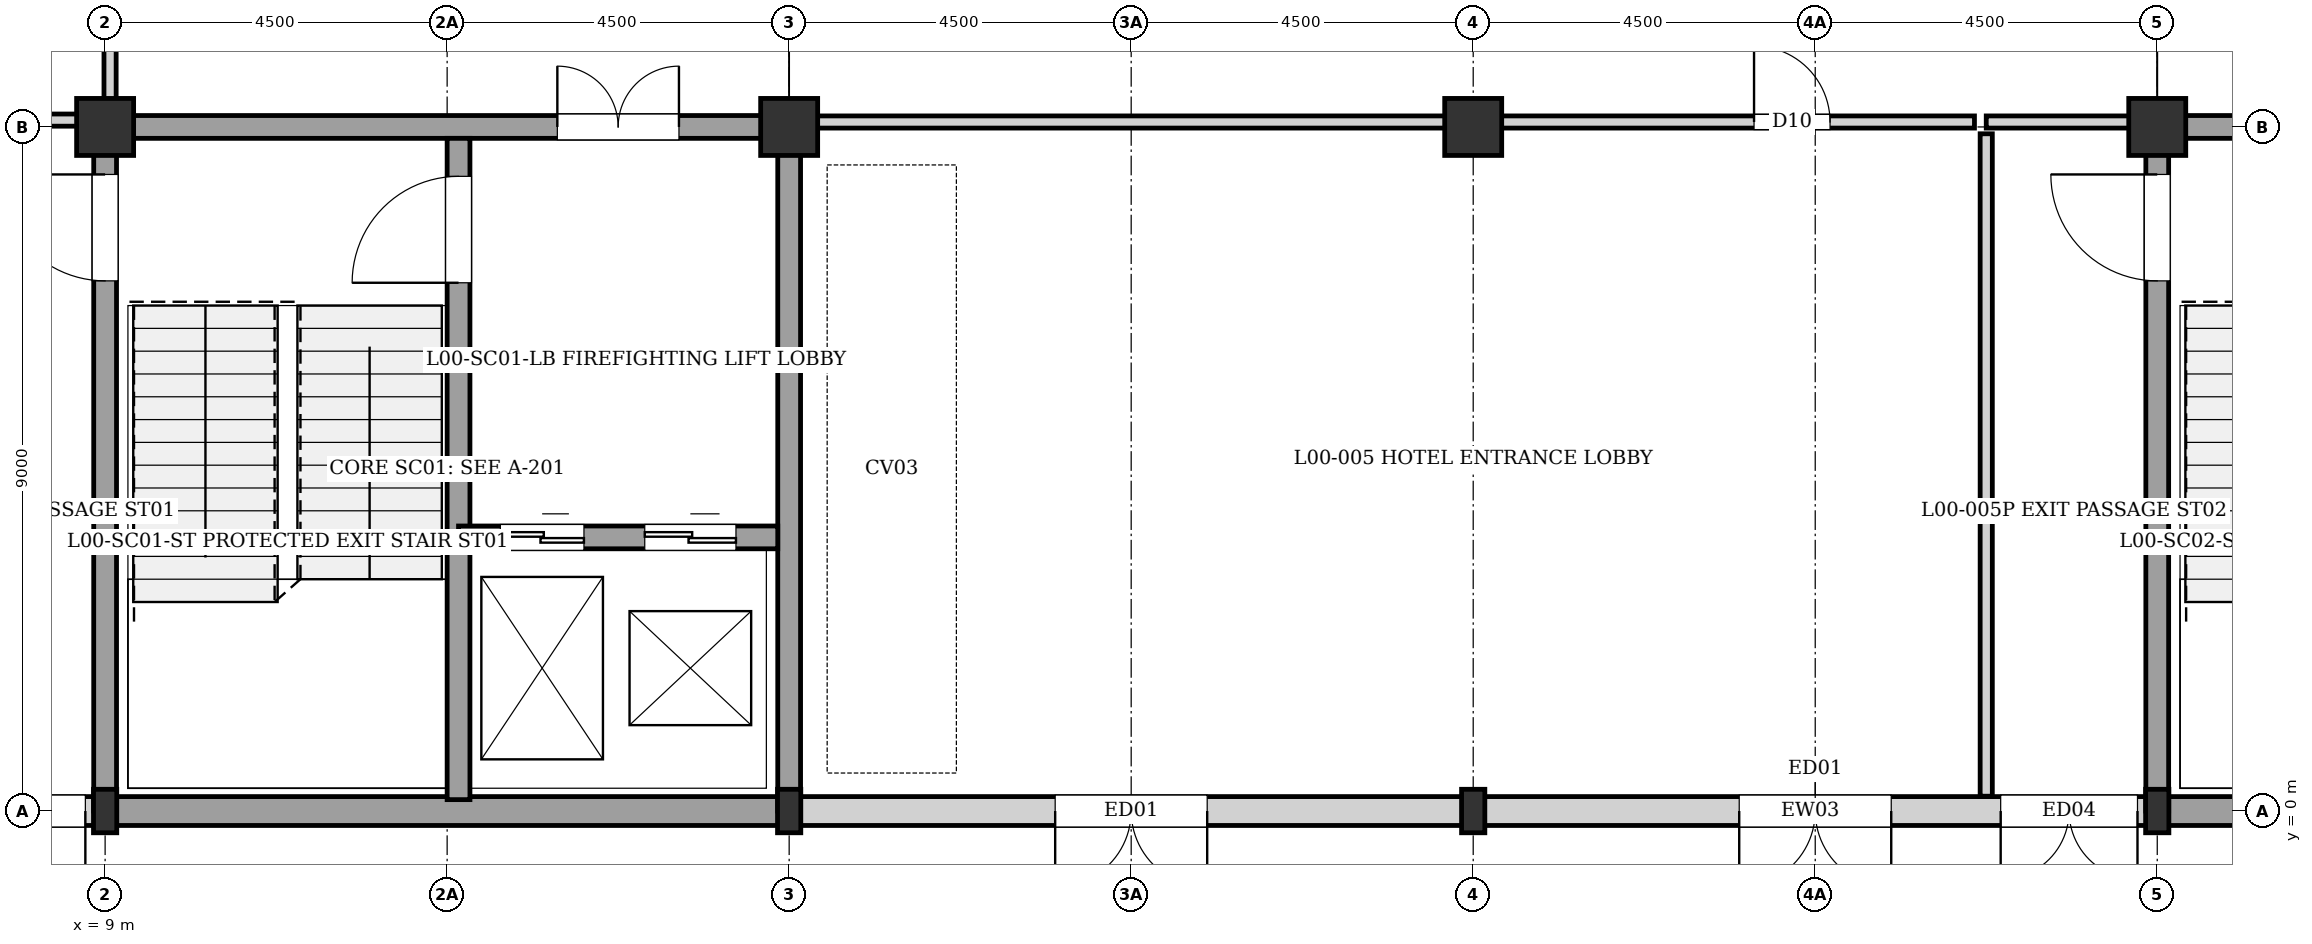
"""IFC4 building model, lengths in metres.
Left out: names, types, materials, properties, quantities, classifications, styles, units other than length and angle.
Written with IfcOpenShell. Run it as: python <this file> out.ifc"""

import sys

from ifc_helpers import new_model, si_unit, direction, frame, frame_2d, origin, origin_2d, place, context, subcontext, project, spatial, rectangle, i_section, extrude, element, fill, save


model = new_model("IFC4")
c1 = context("Model", 3, precision=1e-05, world=origin(), true_north=direction((0.0, 1.0)))
c2 = subcontext(c1, "Body", "Model", "MODEL_VIEW")
j1 = project(units=[si_unit("LENGTHUNIT", "METRE"), si_unit("PLANEANGLEUNIT", "RADIAN")], contexts=[c1])
p1 = place(None, origin())
s1 = spatial("IfcSite", under=j1, at=p1, CompositionType="ELEMENT")
p2 = place(p1, origin())
s2 = spatial("IfcBuilding", under=s1, at=p2, CompositionType="ELEMENT")
p3 = place(p2, origin())
s3 = spatial("IfcBuildingStorey", under=s2, at=p3, CompositionType="ELEMENT", Elevation=0.0)
p4 = place(p3, frame((9.0, 0.0, 0.0), z_axis=(0.0, 0.0, 1.0), x_axis=(1.0, 0.0, 0.0)))
e1 = element("IfcColumn", 1, at=p4, inside=s3, PredefinedType="COLUMN", context=c2, shape_type="SweptSolid", body=[
    extrude(i_section(OverallWidth=0.306, OverallDepth=0.572, WebThickness=0.021, FlangeThickness=0.04, at=origin_2d()), origin(), (0.0, 0.0, 1.0), 4.32),
])
p5 = place(p3, frame((9.0, 9.0, 0.0), z_axis=(0.0, 0.0, 1.0), x_axis=(1.0, 0.0, 0.0)))
e2 = element("IfcColumn", 2, at=p5, inside=s3, PredefinedType="COLUMN", context=c2, shape_type="SweptSolid", body=[
    extrude(rectangle(XDim=0.75, YDim=0.75, at=origin_2d()), origin(), (0.0, 0.0, 1.0), 4.32),
])
p6 = place(p3, frame((18.0, 0.0, 0.0), z_axis=(0.0, 0.0, 1.0), x_axis=(1.0, 0.0, 0.0)))
e3 = element("IfcColumn", 3, at=p6, inside=s3, PredefinedType="COLUMN", context=c2, shape_type="SweptSolid", body=[
    extrude(i_section(OverallWidth=0.306, OverallDepth=0.572, WebThickness=0.021, FlangeThickness=0.04, at=origin_2d()), origin(), (0.0, 0.0, 1.0), 4.32),
])
p7 = place(p3, frame((18.0, 9.0, 0.0), z_axis=(0.0, 0.0, 1.0), x_axis=(1.0, 0.0, 0.0)))
e4 = element("IfcColumn", 4, at=p7, inside=s3, PredefinedType="COLUMN", context=c2, shape_type="SweptSolid", body=[
    extrude(rectangle(XDim=0.75, YDim=0.75, at=origin_2d()), origin(), (0.0, 0.0, 1.0), 4.32),
])
p8 = place(p3, frame((27.0, 0.0, 0.0), z_axis=(0.0, 0.0, 1.0), x_axis=(1.0, 0.0, 0.0)))
e5 = element("IfcColumn", 5, at=p8, inside=s3, PredefinedType="COLUMN", context=c2, shape_type="SweptSolid", body=[
    extrude(i_section(OverallWidth=0.306, OverallDepth=0.572, WebThickness=0.021, FlangeThickness=0.04, at=origin_2d()), origin(), (0.0, 0.0, 1.0), 4.32),
])
p9 = place(p3, frame((27.0, 9.0, 0.0), z_axis=(0.0, 0.0, 1.0), x_axis=(1.0, 0.0, 0.0)))
e6 = element("IfcColumn", 6, at=p9, inside=s3, PredefinedType="COLUMN", context=c2, shape_type="SweptSolid", body=[
    extrude(rectangle(XDim=0.75, YDim=0.75, at=origin_2d()), origin(), (0.0, 0.0, 1.0), 4.32),
])
p10 = place(p3, frame((36.0, 0.0, 0.0), z_axis=(0.0, 0.0, 1.0), x_axis=(1.0, 0.0, 0.0)))
e7 = element("IfcColumn", 7, at=p10, inside=s3, PredefinedType="COLUMN", context=c2, shape_type="SweptSolid", body=[
    extrude(i_section(OverallWidth=0.306, OverallDepth=0.572, WebThickness=0.021, FlangeThickness=0.04, at=origin_2d()), origin(), (0.0, 0.0, 1.0), 4.32),
])
p11 = place(p3, frame((36.0, 9.0, 0.0), z_axis=(0.0, 0.0, 1.0), x_axis=(1.0, 0.0, 0.0)))
e8 = element("IfcColumn", 8, at=p11, inside=s3, PredefinedType="COLUMN", context=c2, shape_type="SweptSolid", body=[
    extrude(rectangle(XDim=0.75, YDim=0.75, at=origin_2d()), origin(), (0.0, 0.0, 1.0), 4.32),
])
p12 = place(p3, frame((45.0, 0.0, 0.0), z_axis=(0.0, 0.0, 1.0), x_axis=(-1.0, 0.0, 0.0)))
e9 = element("IfcWall", 9, at=p12, inside=s3, PredefinedType="SOLIDWALL", context=c2, shape_type="SweptSolid", body=[
    extrude(rectangle(XDim=9.0, YDim=0.38, at=frame_2d((4.5, 0.0))), origin(), (0.0, 0.0, 1.0), 4.055),
])
p13 = place(p3, frame((35.87, 0.0, 0.0), z_axis=(0.0, 0.0, 1.0), x_axis=(-1.0, 0.0, 0.0)))
e10 = element("IfcWall", 10, at=p13, inside=s3, PredefinedType="SOLIDWALL", context=c2, shape_type="SweptSolid", body=[
    extrude(rectangle(XDim=8.87, YDim=0.38, at=frame_2d((4.435, 0.0))), origin(), (0.0, 0.0, 1.0), 3.755),
])
p14 = place(p13, frame((0.13, 0.0, 0.0)))
e11 = element("IfcOpeningElement", 11, at=p14, cuts=e10, PredefinedType="OPENING", context=c2, shape_type="SweptSolid", body=[
    extrude(rectangle(XDim=1.8, YDim=2.2, at=frame_2d((0.9, 1.1))), frame((0.0, 0.2, 0.0), z_axis=(0.0, -1.0, 0.0), x_axis=(1.0, 0.0, 0.0)), (0.0, 0.0, 1.0), 0.4),
])
p15 = place(p13, frame((3.37, 0.0, 0.0)))
e12 = element("IfcOpeningElement", 12, at=p15, cuts=e10, PredefinedType="OPENING", context=c2, shape_type="SweptSolid", body=[
    extrude(rectangle(XDim=2.0, YDim=2.4, at=frame_2d((1.0, 1.2))), frame((0.0, 0.2, 0.0), z_axis=(0.0, -1.0, 0.0), x_axis=(1.0, 0.0, 0.0)), (0.0, 0.0, 1.0), 0.4),
])
p16 = place(p3, frame((27.0, 0.0, 0.0), z_axis=(0.0, 0.0, 1.0), x_axis=(-1.0, 0.0, 0.0)))
e13 = element("IfcWall", 13, at=p16, inside=s3, PredefinedType="SOLIDWALL", context=c2, shape_type="SweptSolid", body=[
    extrude(rectangle(XDim=8.87, YDim=0.38, at=frame_2d((4.435, 0.0))), origin(), (0.0, 0.0, 1.0), 3.825),
])
p17 = place(p16, frame((3.5, 0.0, 0.0)))
e14 = element("IfcOpeningElement", 14, at=p17, cuts=e13, PredefinedType="OPENING", context=c2, shape_type="SweptSolid", body=[
    extrude(rectangle(XDim=2.0, YDim=2.4, at=frame_2d((1.0, 1.2))), frame((0.0, 0.2, 0.0), z_axis=(0.0, -1.0, 0.0), x_axis=(1.0, 0.0, 0.0)), (0.0, 0.0, 1.0), 0.4),
])
p18 = place(p3, frame((18.0, 0.0, 0.0), z_axis=(0.0, 0.0, 1.0), x_axis=(-1.0, 0.0, 0.0)))
e15 = element("IfcWall", 15, at=p18, inside=s3, PredefinedType="SOLIDWALL", context=c2, shape_type="SweptSolid", body=[
    extrude(rectangle(XDim=9.0, YDim=0.38, at=frame_2d((4.5, 0.0))), origin(), (0.0, 0.0, 1.0), 4.055),
])
p19 = place(p3, frame((8.87, 0.0, 0.0), z_axis=(0.0, 0.0, 1.0), x_axis=(-1.0, 0.0, 0.0)))
e16 = element("IfcWall", 16, at=p19, inside=s3, PredefinedType="SOLIDWALL", context=c2, shape_type="SweptSolid", body=[
    extrude(rectangle(XDim=8.87, YDim=0.38, at=frame_2d((4.435, 0.0))), origin(), (0.0, 0.0, 1.0), 3.695),
])
p20 = place(p19, frame((0.13, 0.0, 0.0)))
e17 = element("IfcOpeningElement", 17, at=p20, cuts=e16, PredefinedType="OPENING", context=c2, shape_type="SweptSolid", body=[
    extrude(rectangle(XDim=1.8, YDim=2.2, at=frame_2d((0.9, 1.1))), frame((0.0, 0.2, 0.0), z_axis=(0.0, -1.0, 0.0), x_axis=(1.0, 0.0, 0.0)), (0.0, 0.0, 1.0), 0.4),
])
p21 = place(p19, frame((3.27, 0.0, 0.4)))
e18 = element("IfcOpeningElement", 18, at=p21, cuts=e16, PredefinedType="OPENING", context=c2, shape_type="SweptSolid", body=[
    extrude(rectangle(XDim=2.2, YDim=1.8, at=frame_2d((1.1, 0.9))), frame((0.0, 0.2, 0.0), z_axis=(0.0, -1.0, 0.0), x_axis=(1.0, 0.0, 0.0)), (0.0, 0.0, 1.0), 0.4),
])
p22 = place(p3, frame((18.0, 0.0, 0.0), z_axis=(0.0, 0.0, 1.0), x_axis=(0.0, 1.0, 0.0)))
e19 = element("IfcWall", 19, at=p22, inside=s3, PredefinedType="SHEAR", context=c2, shape_type="SweptSolid", body=[
    extrude(rectangle(XDim=9.0, YDim=0.3, at=frame_2d((4.5, 0.0))), origin(), (0.0, 0.0, 1.0), 4.055),
])
p23 = place(p3, frame((9.0, 9.0, 0.0), z_axis=(0.0, 0.0, 1.0), x_axis=(1.0, 0.0, 0.0)))
e20 = element("IfcWall", 20, at=p23, inside=s3, PredefinedType="SHEAR", context=c2, shape_type="SweptSolid", body=[
    extrude(rectangle(XDim=9.0, YDim=0.3, at=frame_2d((4.5, 0.0))), origin(), (0.0, 0.0, 1.0), 4.055),
])
p24 = place(p23, frame((5.95, 0.0, 0.0)))
e21 = element("IfcOpeningElement", 21, at=p24, cuts=e20, PredefinedType="OPENING", context=c2, shape_type="SweptSolid", body=[
    extrude(rectangle(XDim=1.6, YDim=2.1, at=frame_2d((0.8, 1.05))), frame((0.0, 0.16, 0.0), z_axis=(0.0, -1.0, 0.0), x_axis=(1.0, 0.0, 0.0)), (0.0, 0.0, 1.0), 0.32),
])
p25 = place(p3, frame((9.0, 0.0, 0.0), z_axis=(0.0, 0.0, 1.0), x_axis=(0.0, 1.0, 0.0)))
e22 = element("IfcWall", 22, at=p25, inside=s3, PredefinedType="SHEAR", context=c2, shape_type="SweptSolid", body=[
    extrude(rectangle(XDim=9.0, YDim=0.3, at=frame_2d((4.5, 0.0))), origin(), (0.0, 0.0, 1.0), 4.055),
])
p26 = place(p25, frame((6.975, 0.0, 0.0)))
e23 = element("IfcOpeningElement", 23, at=p26, cuts=e22, PredefinedType="OPENING", context=c2, shape_type="SweptSolid", body=[
    extrude(rectangle(XDim=1.4, YDim=2.02, at=frame_2d((0.7, 1.01))), frame((0.0, 0.16, 0.0), z_axis=(0.0, -1.0, 0.0), x_axis=(1.0, 0.0, 0.0)), (0.0, 0.0, 1.0), 0.32),
])
p27 = place(p3, frame((13.65, 0.15, 0.0), z_axis=(0.0, 0.0, 1.0), x_axis=(0.0, 1.0, 0.0)))
e24 = element("IfcWall", 24, at=p27, inside=s3, PredefinedType="SHEAR", context=c2, shape_type="SweptSolid", body=[
    extrude(rectangle(XDim=8.7, YDim=0.3, at=frame_2d((4.35, 0.0))), origin(), (0.0, 0.0, 1.0), 4.055),
])
p28 = place(p27, frame((6.8, 0.0, 0.0)))
e25 = element("IfcOpeningElement", 25, at=p28, cuts=e24, PredefinedType="OPENING", context=c2, shape_type="SweptSolid", body=[
    extrude(rectangle(XDim=1.4, YDim=2.02, at=frame_2d((0.7, 1.01))), frame((0.0, 0.16, 0.0), z_axis=(0.0, -1.0, 0.0), x_axis=(1.0, 0.0, 0.0)), (0.0, 0.0, 1.0), 0.32),
])
p29 = place(p3, frame((13.65, 3.6, 0.0), z_axis=(0.0, 0.0, 1.0), x_axis=(1.0, 0.0, 0.0)))
e26 = element("IfcWall", 26, at=p29, inside=s3, PredefinedType="SHEAR", context=c2, shape_type="SweptSolid", body=[
    extrude(rectangle(XDim=4.2, YDim=0.3, at=frame_2d((2.1, 0.0))), origin(), (0.0, 0.0, 1.0), 4.055),
])
p30 = place(p29, frame((0.55, 0.0, 0.0)))
e27 = element("IfcOpeningElement", 27, at=p30, cuts=e26, PredefinedType="OPENING", context=c2, shape_type="SweptSolid", body=[
    extrude(rectangle(XDim=1.1, YDim=2.1, at=frame_2d((0.55, 1.05))), frame((0.0, 0.16, 0.0), z_axis=(0.0, -1.0, 0.0), x_axis=(1.0, 0.0, 0.0)), (0.0, 0.0, 1.0), 0.32),
])
p31 = place(p29, frame((2.45, 0.0, 0.0)))
e28 = element("IfcOpeningElement", 28, at=p31, cuts=e26, PredefinedType="OPENING", context=c2, shape_type="SweptSolid", body=[
    extrude(rectangle(XDim=1.2, YDim=2.2, at=frame_2d((0.6, 1.1))), frame((0.0, 0.16, 0.0), z_axis=(0.0, -1.0, 0.0), x_axis=(1.0, 0.0, 0.0)), (0.0, 0.0, 1.0), 0.32),
])
p32 = place(p3, frame((36.0, 9.0, 0.0), z_axis=(0.0, 0.0, 1.0), x_axis=(1.0, 0.0, 0.0)))
e29 = element("IfcWall", 29, at=p32, inside=s3, PredefinedType="SHEAR", context=c2, shape_type="SweptSolid", body=[
    extrude(rectangle(XDim=9.0, YDim=0.3, at=frame_2d((4.5, 0.0))), origin(), (0.0, 0.0, 1.0), 4.055),
])
p33 = place(p32, frame((5.95, 0.0, 0.0)))
e30 = element("IfcOpeningElement", 30, at=p33, cuts=e29, PredefinedType="OPENING", context=c2, shape_type="SweptSolid", body=[
    extrude(rectangle(XDim=1.6, YDim=2.1, at=frame_2d((0.8, 1.05))), frame((0.0, 0.16, 0.0), z_axis=(0.0, -1.0, 0.0), x_axis=(1.0, 0.0, 0.0)), (0.0, 0.0, 1.0), 0.32),
])
p34 = place(p3, frame((36.0, 0.0, 0.0), z_axis=(0.0, 0.0, 1.0), x_axis=(0.0, 1.0, 0.0)))
e31 = element("IfcWall", 31, at=p34, inside=s3, PredefinedType="SHEAR", context=c2, shape_type="SweptSolid", body=[
    extrude(rectangle(XDim=9.0, YDim=0.3, at=frame_2d((4.5, 0.0))), origin(), (0.0, 0.0, 1.0), 4.055),
])
p35 = place(p34, frame((6.975, 0.0, 0.0)))
e32 = element("IfcOpeningElement", 32, at=p35, cuts=e31, PredefinedType="OPENING", context=c2, shape_type="SweptSolid", body=[
    extrude(rectangle(XDim=1.4, YDim=2.02, at=frame_2d((0.7, 1.01))), frame((0.0, 0.16, 0.0), z_axis=(0.0, -1.0, 0.0), x_axis=(1.0, 0.0, 0.0)), (0.0, 0.0, 1.0), 0.32),
])
p36 = place(p3, frame((9.065, 9.155, 0.0), z_axis=(0.0, 0.0, 1.0), x_axis=(0.0, 1.0, 0.0)))
e33 = element("IfcWall", 33, at=p36, inside=s3, PredefinedType="PARTITIONING", context=c2, shape_type="SweptSolid", body=[
    extrude(rectangle(XDim=2.775, YDim=0.16, at=frame_2d((1.387, 0.0))), origin(), (0.0, 0.0, 1.0), 3.565),
])
p37 = place(p3, frame((33.75, 9.065, 0.0), z_axis=(0.0, 0.0, 1.0), x_axis=(1.0, 0.0, 0.0)))
e34 = element("IfcWall", 34, at=p37, inside=s3, PredefinedType="PARTITIONING", context=c2, shape_type="SweptSolid", body=[
    extrude(rectangle(XDim=2.095, YDim=0.16, at=frame_2d((1.047, 0.0))), origin(), (0.0, 0.0, 1.0), 4.055),
])
p38 = place(p3, frame((6.905, 9.09, 0.0), z_axis=(0.0, 0.0, 1.0), x_axis=(1.0, 0.0, 0.0)))
e35 = element("IfcWall", 35, at=p38, inside=s3, PredefinedType="PARTITIONING", context=c2, shape_type="SweptSolid", body=[
    extrude(rectangle(XDim=2.005, YDim=0.16, at=frame_2d((1.002, 0.0))), origin(), (0.0, 0.0, 1.0), 3.555),
])
p39 = place(p3, frame((33.75, 0.195, 0.0), z_axis=(0.0, 0.0, 1.0), x_axis=(0.0, 1.0, 0.0)))
e36 = element("IfcWall", 36, at=p39, inside=s3, PredefinedType="PARTITIONING", context=c2, shape_type="SweptSolid", body=[
    extrude(rectangle(XDim=8.715, YDim=0.16, at=frame_2d((4.357, 0.0))), origin(), (0.0, 0.0, 1.0), 4.055),
])
p40 = place(p3, frame((18.155, 9.065, 0.0), z_axis=(0.0, 0.0, 1.0), x_axis=(1.0, 0.0, 0.0)))
e37 = element("IfcWall", 37, at=p40, inside=s3, PredefinedType="PARTITIONING", context=c2, shape_type="SweptSolid", body=[
    extrude(rectangle(XDim=15.44, YDim=0.16, at=frame_2d((7.72, 0.0))), origin(), (0.0, 0.0, 1.0), 4.055),
])
p41 = place(p40, frame((12.54, 0.0, 0.0)))
e38 = element("IfcOpeningElement", 38, at=p41, cuts=e37, PredefinedType="OPENING", context=c2, shape_type="SweptSolid", body=[
    extrude(rectangle(XDim=1.0, YDim=2.1, at=frame_2d((0.5, 1.05))), frame((0.0, 0.09, 0.0), z_axis=(0.0, -1.0, 0.0), x_axis=(1.0, 0.0, 0.0)), (0.0, 0.0, 1.0), 0.18),
])
p42 = place(p14, origin())
e39 = element("IfcDoor", 39, at=p42, inside=s3, OperationType="DOUBLE_DOOR_SINGLE_SWING", PredefinedType="DOOR", context=c2, shape_type="SweptSolid", body=[
    extrude(rectangle(XDim=1.8, YDim=2.2, at=frame_2d((0.9, 1.1))), frame((0.0, 0.025, 0.0), z_axis=(0.0, -1.0, 0.0), x_axis=(1.0, 0.0, 0.0)), (0.0, 0.0, 1.0), 0.05),
])
fill(e11, e39)
p43 = place(p15, origin())
e40 = element("IfcDoor", 40, at=p43, inside=s3, OperationType="DOUBLE_DOOR_SINGLE_SWING", PredefinedType="DOOR", context=c2, shape_type="SweptSolid", body=[
    extrude(rectangle(XDim=2.0, YDim=2.4, at=frame_2d((1.0, 1.2))), frame((0.0, 0.025, 0.0), z_axis=(0.0, -1.0, 0.0), x_axis=(1.0, 0.0, 0.0)), (0.0, 0.0, 1.0), 0.05),
])
fill(e12, e40)
p44 = place(p17, origin())
e41 = element("IfcDoor", 41, at=p44, inside=s3, OperationType="DOUBLE_DOOR_SINGLE_SWING", PredefinedType="DOOR", context=c2, shape_type="SweptSolid", body=[
    extrude(rectangle(XDim=2.0, YDim=2.4, at=frame_2d((1.0, 1.2))), frame((0.0, 0.025, 0.0), z_axis=(0.0, -1.0, 0.0), x_axis=(1.0, 0.0, 0.0)), (0.0, 0.0, 1.0), 0.05),
])
fill(e14, e41)
p45 = place(p20, origin())
e42 = element("IfcDoor", 42, at=p45, inside=s3, OperationType="DOUBLE_DOOR_SINGLE_SWING", PredefinedType="DOOR", context=c2, shape_type="SweptSolid", body=[
    extrude(rectangle(XDim=1.8, YDim=2.2, at=frame_2d((0.9, 1.1))), frame((0.0, 0.025, 0.0), z_axis=(0.0, -1.0, 0.0), x_axis=(1.0, 0.0, 0.0)), (0.0, 0.0, 1.0), 0.05),
])
fill(e17, e42)
p46 = place(p24, origin())
e43 = element("IfcDoor", 43, at=p46, inside=s3, OperationType="DOUBLE_DOOR_SINGLE_SWING", PredefinedType="DOOR", context=c2, shape_type="SweptSolid", body=[
    extrude(rectangle(XDim=1.6, YDim=2.1, at=frame_2d((0.8, 1.05))), frame((0.0, 0.025, 0.0), z_axis=(0.0, -1.0, 0.0), x_axis=(1.0, 0.0, 0.0)), (0.0, 0.0, 1.0), 0.05),
])
fill(e21, e43)
p47 = place(p26, origin())
e44 = element("IfcDoor", 44, at=p47, inside=s3, OperationType="SINGLE_SWING_RIGHT", PredefinedType="DOOR", context=c2, shape_type="SweptSolid", body=[
    extrude(rectangle(XDim=1.4, YDim=2.02, at=frame_2d((0.7, 1.01))), frame((0.0, 0.025, 0.0), z_axis=(0.0, -1.0, 0.0), x_axis=(1.0, 0.0, 0.0)), (0.0, 0.0, 1.0), 0.05),
])
fill(e23, e44)
p48 = place(p28, origin())
e45 = element("IfcDoor", 45, at=p48, inside=s3, OperationType="SINGLE_SWING_LEFT", PredefinedType="DOOR", context=c2, shape_type="SweptSolid", body=[
    extrude(rectangle(XDim=1.4, YDim=2.02, at=frame_2d((0.7, 1.01))), frame((0.0, 0.025, 0.0), z_axis=(0.0, -1.0, 0.0), x_axis=(1.0, 0.0, 0.0)), (0.0, 0.0, 1.0), 0.05),
])
fill(e25, e45)
p49 = place(p30, origin())
e46 = element("IfcDoor", 46, at=p49, inside=s3, OperationType="DOUBLE_DOOR_SLIDING", PredefinedType="DOOR", context=c2, shape_type="SweptSolid", body=[
    extrude(rectangle(XDim=1.1, YDim=2.1, at=frame_2d((0.55, 1.05))), frame((0.0, 0.025, 0.0), z_axis=(0.0, -1.0, 0.0), x_axis=(1.0, 0.0, 0.0)), (0.0, 0.0, 1.0), 0.05),
])
fill(e27, e46)
p50 = place(p31, origin())
e47 = element("IfcDoor", 47, at=p50, inside=s3, OperationType="DOUBLE_DOOR_SLIDING", PredefinedType="DOOR", context=c2, shape_type="SweptSolid", body=[
    extrude(rectangle(XDim=1.2, YDim=2.2, at=frame_2d((0.6, 1.1))), frame((0.0, 0.025, 0.0), z_axis=(0.0, -1.0, 0.0), x_axis=(1.0, 0.0, 0.0)), (0.0, 0.0, 1.0), 0.05),
])
fill(e28, e47)
p51 = place(p35, origin())
e48 = element("IfcDoor", 48, at=p51, inside=s3, OperationType="SINGLE_SWING_RIGHT", PredefinedType="DOOR", context=c2, shape_type="SweptSolid", body=[
    extrude(rectangle(XDim=1.4, YDim=2.02, at=frame_2d((0.7, 1.01))), frame((0.0, 0.025, 0.0), z_axis=(0.0, -1.0, 0.0), x_axis=(1.0, 0.0, 0.0)), (0.0, 0.0, 1.0), 0.05),
])
fill(e32, e48)
p52 = place(p41, origin())
e49 = element("IfcDoor", 49, at=p52, inside=s3, OperationType="SINGLE_SWING_LEFT", PredefinedType="DOOR", context=c2, shape_type="SweptSolid", body=[
    extrude(rectangle(XDim=1.0, YDim=2.1, at=frame_2d((0.5, 1.05))), frame((0.0, 0.025, 0.0), z_axis=(0.0, -1.0, 0.0), x_axis=(1.0, 0.0, 0.0)), (0.0, 0.0, 1.0), 0.05),
])
fill(e38, e49)
save(model, sys.argv[1])
